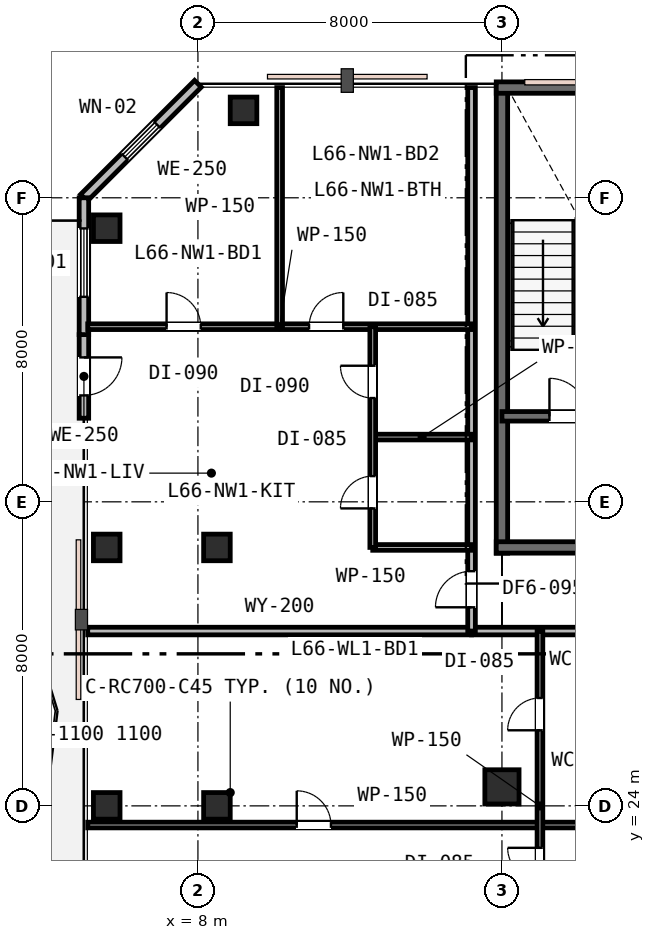
"""IFC4 building model, lengths in metres.
Left out: names, types, materials, properties, quantities, classifications, styles, units other than length and angle.
Written with IfcOpenShell. Run it as: python <this file> out.ifc"""

import sys

from ifc_helpers import new_model, si_unit, direction, frame, frame_2d, origin, origin_2d, place, context, subcontext, project, spatial, rectangle, extrude, element, fill, save


model = new_model("IFC4")
c1 = context("Model", 3, precision=1e-05, world=origin(), true_north=direction((0.0, 1.0)))
c2 = subcontext(c1, "Body", "Model", "MODEL_VIEW")
j1 = project(units=[si_unit("LENGTHUNIT", "METRE"), si_unit("PLANEANGLEUNIT", "RADIAN")], contexts=[c1])
p1 = place(None, origin())
s1 = spatial("IfcSite", under=j1, at=p1, CompositionType="ELEMENT")
p2 = place(p1, origin())
s2 = spatial("IfcBuilding", under=s1, at=p2, CompositionType="ELEMENT")
p3 = place(p2, frame((0.0, 0.0, 256.4)))
s3 = spatial("IfcBuildingStorey", under=s2, at=p3, CompositionType="ELEMENT", Elevation=256.4)
p4 = place(p3, frame((16.0, 30.65, 0.0), z_axis=(0.0, 0.0, 1.0), x_axis=(0.0, 1.0, 0.0)))
e1 = element("IfcWall", 1, at=p4, inside=s3, PredefinedType="SHEAR", context=c2, shape_type="SweptSolid", body=[
    extrude(rectangle(XDim=12.3, YDim=0.3, at=frame_2d((6.15, 0.0))), origin(), (0.0, 0.0, 1.0), 3.8),
])
p5 = place(p3, frame((15.85, 42.9, 0.0), z_axis=(0.0, 0.0, 1.0), x_axis=(1.0, 0.0, 0.0)))
e2 = element("IfcWall", 2, at=p5, inside=s3, PredefinedType="SHEAR", context=c2, shape_type="SweptSolid", body=[
    extrude(rectangle(XDim=24.3, YDim=0.3, at=frame_2d((12.15, 0.0))), origin(), (0.0, 0.0, 1.0), 3.8),
])
p6 = place(p3, frame((15.85, 30.8, 0.0), z_axis=(0.0, 0.0, 1.0), x_axis=(1.0, 0.0, 0.0)))
e3 = element("IfcWall", 3, at=p6, inside=s3, PredefinedType="SHEAR", context=c2, shape_type="SweptSolid", body=[
    extrude(rectangle(XDim=11.2, YDim=0.3, at=frame_2d((5.6, 0.0))), origin(), (0.0, 0.0, 1.0), 3.8),
])
p7 = place(p6, frame((2.45, 0.0, 0.0)))
e4 = element("IfcOpeningElement", 4, at=p7, cuts=e3, PredefinedType="OPENING", context=c2, shape_type="SweptSolid", body=[
    extrude(rectangle(XDim=1.1, YDim=2.15, at=frame_2d((0.55, 1.075))), frame((0.0, 0.16, 0.0), z_axis=(0.0, -1.0, 0.0), x_axis=(1.0, 0.0, 0.0)), (0.0, 0.0, 1.0), 0.32),
])
p8 = place(p3, frame((16.0, 34.25, 0.0), z_axis=(0.0, 0.0, 1.0), x_axis=(1.0, 0.0, 0.0)))
e5 = element("IfcWall", 5, at=p8, inside=s3, PredefinedType="SHEAR", context=c2, shape_type="SweptSolid", body=[
    extrude(rectangle(XDim=6.05, YDim=0.25, at=frame_2d((3.025, 0.0))), origin(), (0.0, 0.0, 1.0), 3.8),
])
p9 = place(p8, frame((1.25, 0.0, 0.0)))
e6 = element("IfcOpeningElement", 6, at=p9, cuts=e5, PredefinedType="OPENING", context=c2, shape_type="SweptSolid", body=[
    extrude(rectangle(XDim=1.0, YDim=2.15, at=frame_2d((0.5, 1.075))), frame((0.0, 0.135, 0.0), z_axis=(0.0, -1.0, 0.0), x_axis=(1.0, 0.0, 0.0)), (0.0, 0.0, 1.0), 0.27),
])
p10 = place(p8, frame((4.2, 0.0, 0.0)))
e7 = element("IfcOpeningElement", 7, at=p10, cuts=e5, PredefinedType="OPENING", context=c2, shape_type="SweptSolid", body=[
    extrude(rectangle(XDim=1.1, YDim=2.15, at=frame_2d((0.55, 1.075))), frame((0.0, 0.135, 0.0), z_axis=(0.0, -1.0, 0.0), x_axis=(1.0, 0.0, 0.0)), (0.0, 0.0, 1.0), 0.27),
])
p11 = place(p3, frame((8.5, 24.0, 0.0), z_axis=(0.0, 0.0, 1.0), x_axis=(1.0, 0.0, 0.0)))
e8 = element("IfcColumn", 8, at=p11, inside=s3, PredefinedType="COLUMN", context=c2, shape_type="SweptSolid", body=[
    extrude(rectangle(XDim=0.7, YDim=0.7, at=origin_2d()), origin(), (0.0, 0.0, 1.0), 3.8),
])
p12 = place(p3, frame((16.0, 24.5, 0.0), z_axis=(0.0, 0.0, 1.0), x_axis=(1.0, 0.0, 0.0)))
e9 = element("IfcColumn", 9, at=p12, inside=s3, PredefinedType="COLUMN", context=c2, shape_type="SweptSolid", body=[
    extrude(rectangle(XDim=0.9, YDim=0.9, at=origin_2d()), origin(), (0.0, 0.0, 1.0), 3.8),
])
for number, where, z_axis, x_axis in (
    (10, (5.6, 24.0, 0.0), (0.0, 0.0, 1.0), (1.0, 0.0, 0.0)),
    (11, (5.6, 30.8, 0.0), (0.0, 0.0, 1.0), (1.0, 0.0, 0.0)),
    (12, (5.6, 39.2, 0.0), (0.0, 0.0, 1.0), (1.0, 0.0, 0.0)),
    (13, (8.5, 30.8, 0.0), (0.0, 0.0, 1.0), (1.0, 0.0, 0.0)),
    (14, (9.2, 42.3, 0.0), (0.0, 0.0, 1.0), (1.0, 0.0, 0.0)),
):
    element("IfcColumn", number, at=place(p3, frame(where, z_axis=z_axis, x_axis=x_axis)), inside=s3, PredefinedType="COLUMN", context=c2, shape_type="SweptSolid", body=[
        extrude(rectangle(XDim=0.7, YDim=0.7, at=origin_2d()), origin(), (0.0, 0.0, 1.0), 3.8),
    ])
p13 = place(p3, frame((8.0, 43.0, 0.0), z_axis=(0.0, 0.0, 1.0), x_axis=(-0.707106781187, -0.707106781187, 0.0)))
e15 = element("IfcWall", 15, at=p13, inside=s3, PredefinedType="STANDARD", context=c2, shape_type="SweptSolid", body=[
    extrude(rectangle(XDim=4.243, YDim=0.25, at=frame_2d((2.121, 0.0))), origin(), (0.0, 0.0, 1.0), 3.53),
])
p14 = place(p13, frame((1.521, 0.0, 0.85)))
e16 = element("IfcOpeningElement", 16, at=p14, cuts=e15, PredefinedType="OPENING", context=c2, shape_type="SweptSolid", body=[
    extrude(rectangle(XDim=1.2, YDim=1.6, at=frame_2d((0.6, 0.8))), frame((0.0, 0.135, 0.0), z_axis=(0.0, -1.0, 0.0), x_axis=(1.0, 0.0, 0.0)), (0.0, 0.0, 1.0), 0.27),
])
p15 = place(p3, frame((5.0, 36.4, 0.0), z_axis=(0.0, 0.0, 1.0), x_axis=(0.0, -1.0, 0.0)))
e17 = element("IfcWall", 17, at=p15, inside=s3, PredefinedType="STANDARD", context=c2, shape_type="SweptSolid", body=[
    extrude(rectangle(XDim=2.2, YDim=0.25, at=frame_2d((1.1, 0.0))), origin(), (0.0, 0.0, 1.0), 3.53),
])
p16 = place(p15, frame((0.6, 0.0, 0.0)))
e18 = element("IfcOpeningElement", 18, at=p16, cuts=e17, PredefinedType="OPENING", context=c2, shape_type="SweptSolid", body=[
    extrude(rectangle(XDim=1.0, YDim=2.15, at=frame_2d((0.5, 1.075))), frame((0.0, 0.135, 0.0), z_axis=(0.0, -1.0, 0.0), x_axis=(1.0, 0.0, 0.0)), (0.0, 0.0, 1.0), 0.27),
])
p17 = place(p3, frame((5.0, 40.0, 0.0), z_axis=(0.0, 0.0, 1.0), x_axis=(0.0, -1.0, 0.0)))
e19 = element("IfcWall", 19, at=p17, inside=s3, PredefinedType="STANDARD", context=c2, shape_type="SweptSolid", body=[
    extrude(rectangle(XDim=3.6, YDim=0.25, at=frame_2d((1.8, 0.0))), origin(), (0.0, 0.0, 1.0), 3.53),
])
p18 = place(p17, frame((0.806, 0.0, 0.75)))
e20 = element("IfcOpeningElement", 20, at=p18, cuts=e19, PredefinedType="OPENING", context=c2, shape_type="SweptSolid", body=[
    extrude(rectangle(XDim=1.8, YDim=1.85, at=frame_2d((0.9, 0.925))), frame((0.0, 0.135, 0.0), z_axis=(0.0, -1.0, 0.0), x_axis=(1.0, 0.0, 0.0)), (0.0, 0.0, 1.0), 0.27),
])
p19 = place(p3, frame((5.1, 28.6, 0.0), z_axis=(0.0, 0.0, 1.0), x_axis=(1.0, 0.0, 0.0)))
e21 = element("IfcWall", 21, at=p19, inside=s3, PredefinedType="PARTITIONING", context=c2, shape_type="SweptSolid", body=[
    extrude(rectangle(XDim=10.1, YDim=0.2, at=frame_2d((5.05, 0.0))), origin(), (0.0, 0.0, 1.0), 3.16),
])
p20 = place(p3, frame((15.2, 28.6, 0.0), z_axis=(0.0, 0.0, 1.0), x_axis=(1.0, 0.0, 0.0)))
e22 = element("IfcWall", 22, at=p20, inside=s3, PredefinedType="PARTITIONING", context=c2, shape_type="SweptSolid", body=[
    extrude(rectangle(XDim=4.4, YDim=0.2, at=frame_2d((2.2, 0.0))), origin(), (0.0, 0.0, 1.0), 3.16),
])
p21 = place(p3, frame((15.2, 28.6, 0.0), z_axis=(0.0, 0.0, 1.0), x_axis=(0.0, 1.0, 0.0)))
e23 = element("IfcWall", 23, at=p21, inside=s3, PredefinedType="PARTITIONING", context=c2, shape_type="SweptSolid", body=[
    extrude(rectangle(XDim=14.3, YDim=0.2, at=frame_2d((7.15, 0.0))), origin(), (0.0, 0.0, 1.0), 3.16),
])
p22 = place(p21, frame((0.625, 0.0, 0.0)))
e24 = element("IfcOpeningElement", 24, at=p22, cuts=e23, PredefinedType="OPENING", context=c2, shape_type="SweptSolid", body=[
    extrude(rectangle(XDim=0.95, YDim=2.15, at=frame_2d((0.475, 1.075))), frame((0.0, 0.11, 0.0), z_axis=(0.0, -1.0, 0.0), x_axis=(1.0, 0.0, 0.0)), (0.0, 0.0, 1.0), 0.22),
])
p23 = place(p3, frame((12.6, 30.8, 0.0), z_axis=(0.0, 0.0, 1.0), x_axis=(1.0, 0.0, 0.0)))
e25 = element("IfcWall", 25, at=p23, inside=s3, PredefinedType="PARTITIONING", context=c2, shape_type="SweptSolid", body=[
    extrude(rectangle(XDim=2.6, YDim=0.15, at=frame_2d((1.3, 0.0))), origin(), (0.0, 0.0, 1.0), 3.16),
])
p24 = place(p3, frame((12.6, 33.704, 0.0), z_axis=(0.0, 0.0, 1.0), x_axis=(1.0, 0.0, 0.0)))
e26 = element("IfcWall", 26, at=p24, inside=s3, PredefinedType="PARTITIONING", context=c2, shape_type="SweptSolid", body=[
    extrude(rectangle(XDim=2.6, YDim=0.15, at=frame_2d((1.3, 0.0))), origin(), (0.0, 0.0, 1.0), 3.53),
])
p25 = place(p3, frame((5.1, 36.608, 0.0), z_axis=(0.0, 0.0, 1.0), x_axis=(1.0, 0.0, 0.0)))
e27 = element("IfcWall", 27, at=p25, inside=s3, PredefinedType="PARTITIONING", context=c2, shape_type="SweptSolid", body=[
    extrude(rectangle(XDim=10.1, YDim=0.15, at=frame_2d((5.05, 0.0))), origin(), (0.0, 0.0, 1.0), 3.27),
])
p26 = place(p25, frame((2.075, 0.0, 0.0)))
e28 = element("IfcOpeningElement", 28, at=p26, cuts=e27, PredefinedType="OPENING", context=c2, shape_type="SweptSolid", body=[
    extrude(rectangle(XDim=0.9, YDim=2.15, at=frame_2d((0.45, 1.075))), frame((0.0, 0.085, 0.0), z_axis=(0.0, -1.0, 0.0), x_axis=(1.0, 0.0, 0.0)), (0.0, 0.0, 1.0), 0.17),
])
p27 = place(p25, frame((5.825, 0.0, 0.0)))
e29 = element("IfcOpeningElement", 29, at=p27, cuts=e27, PredefinedType="OPENING", context=c2, shape_type="SweptSolid", body=[
    extrude(rectangle(XDim=0.9, YDim=2.15, at=frame_2d((0.45, 1.075))), frame((0.0, 0.085, 0.0), z_axis=(0.0, -1.0, 0.0), x_axis=(1.0, 0.0, 0.0)), (0.0, 0.0, 1.0), 0.17),
])
p28 = place(p3, frame((12.6, 30.8, 0.0), z_axis=(0.0, 0.0, 1.0), x_axis=(0.0, 1.0, 0.0)))
e30 = element("IfcWall", 30, at=p28, inside=s3, PredefinedType="PARTITIONING", context=c2, shape_type="SweptSolid", body=[
    extrude(rectangle(XDim=5.808, YDim=0.15, at=frame_2d((2.904, 0.0))), origin(), (0.0, 0.0, 1.0), 3.16),
])
p29 = place(p28, frame((1.027, 0.0, 0.0)))
e31 = element("IfcOpeningElement", 31, at=p29, cuts=e30, PredefinedType="OPENING", context=c2, shape_type="SweptSolid", body=[
    extrude(rectangle(XDim=0.85, YDim=2.15, at=frame_2d((0.425, 1.075))), frame((0.0, 0.085, 0.0), z_axis=(0.0, -1.0, 0.0), x_axis=(1.0, 0.0, 0.0)), (0.0, 0.0, 1.0), 0.17),
])
p30 = place(p28, frame((3.931, 0.0, 0.0)))
e32 = element("IfcOpeningElement", 32, at=p30, cuts=e30, PredefinedType="OPENING", context=c2, shape_type="SweptSolid", body=[
    extrude(rectangle(XDim=0.85, YDim=2.15, at=frame_2d((0.425, 1.075))), frame((0.0, 0.085, 0.0), z_axis=(0.0, -1.0, 0.0), x_axis=(1.0, 0.0, 0.0)), (0.0, 0.0, 1.0), 0.17),
])
p31 = place(p3, frame((10.15, 36.608, 0.0), z_axis=(0.0, 0.0, 1.0), x_axis=(0.0, 1.0, 0.0)))
e33 = element("IfcWall", 33, at=p31, inside=s3, PredefinedType="PARTITIONING", context=c2, shape_type="SweptSolid", body=[
    extrude(rectangle(XDim=6.292, YDim=0.15, at=frame_2d((3.146, 0.0))), origin(), (0.0, 0.0, 1.0), 3.53),
])
p32 = place(p3, frame((5.1, 23.496, 0.0), z_axis=(0.0, 0.0, 1.0), x_axis=(1.0, 0.0, 0.0)))
e34 = element("IfcWall", 34, at=p32, inside=s3, PredefinedType="PARTITIONING", context=c2, shape_type="SweptSolid", body=[
    extrude(rectangle(XDim=14.5, YDim=0.15, at=frame_2d((7.25, 0.0))), origin(), (0.0, 0.0, 1.0), 3.16),
])
p33 = place(p32, frame((5.5, 0.0, 0.0)))
e35 = element("IfcOpeningElement", 35, at=p33, cuts=e34, PredefinedType="OPENING", context=c2, shape_type="SweptSolid", body=[
    extrude(rectangle(XDim=0.9, YDim=2.15, at=frame_2d((0.45, 1.075))), frame((0.0, 0.085, 0.0), z_axis=(0.0, -1.0, 0.0), x_axis=(1.0, 0.0, 0.0)), (0.0, 0.0, 1.0), 0.17),
])
p34 = place(p3, frame((17.0, 19.396, 0.0), z_axis=(0.0, 0.0, 1.0), x_axis=(0.0, 1.0, 0.0)))
e36 = element("IfcWall", 36, at=p34, inside=s3, PredefinedType="PARTITIONING", context=c2, shape_type="SweptSolid", body=[
    extrude(rectangle(XDim=9.204, YDim=0.15, at=frame_2d((4.602, 0.0))), origin(), (0.0, 0.0, 1.0), 3.16),
])
p35 = place(p34, frame((0.6, 0.0, 0.0)))
e37 = element("IfcOpeningElement", 37, at=p35, cuts=e36, PredefinedType="OPENING", context=c2, shape_type="SweptSolid", body=[
    extrude(rectangle(XDim=0.85, YDim=2.15, at=frame_2d((0.425, 1.075))), frame((0.0, 0.085, 0.0), z_axis=(0.0, -1.0, 0.0), x_axis=(1.0, 0.0, 0.0)), (0.0, 0.0, 1.0), 0.17),
])
p36 = place(p34, frame((2.65, 0.0, 0.0)))
e38 = element("IfcOpeningElement", 38, at=p36, cuts=e36, PredefinedType="OPENING", context=c2, shape_type="SweptSolid", body=[
    extrude(rectangle(XDim=0.85, YDim=2.15, at=frame_2d((0.425, 1.075))), frame((0.0, 0.085, 0.0), z_axis=(0.0, -1.0, 0.0), x_axis=(1.0, 0.0, 0.0)), (0.0, 0.0, 1.0), 0.17),
])
p37 = place(p34, frame((6.593, 0.0, 0.0)))
e39 = element("IfcOpeningElement", 39, at=p37, cuts=e36, PredefinedType="OPENING", context=c2, shape_type="SweptSolid", body=[
    extrude(rectangle(XDim=0.85, YDim=2.15, at=frame_2d((0.425, 1.075))), frame((0.0, 0.085, 0.0), z_axis=(0.0, -1.0, 0.0), x_axis=(1.0, 0.0, 0.0)), (0.0, 0.0, 1.0), 0.17),
])
p38 = place(p14, origin())
e40 = element("IfcWindow", 40, at=p38, inside=s3, PartitioningType="SINGLE_PANEL", PredefinedType="WINDOW", context=c2, shape_type="SweptSolid", body=[
    extrude(rectangle(XDim=1.2, YDim=1.6, at=frame_2d((0.6, 0.8))), frame((0.0, 0.03, 0.0), z_axis=(0.0, -1.0, 0.0), x_axis=(1.0, 0.0, 0.0)), (0.0, 0.0, 1.0), 0.06),
])
fill(e16, e40)
p39 = place(p16, origin())
e41 = element("IfcDoor", 41, at=p39, inside=s3, OperationType="SINGLE_SWING_LEFT", PredefinedType="DOOR", context=c2, shape_type="SweptSolid", body=[
    extrude(rectangle(XDim=1.0, YDim=2.15, at=frame_2d((0.5, 1.075))), frame((0.0, 0.025, 0.0), z_axis=(0.0, -1.0, 0.0), x_axis=(1.0, 0.0, 0.0)), (0.0, 0.0, 1.0), 0.05),
])
fill(e18, e41)
p40 = place(p18, origin())
e42 = element("IfcWindow", 42, at=p40, inside=s3, PartitioningType="SINGLE_PANEL", PredefinedType="WINDOW", context=c2, shape_type="SweptSolid", body=[
    extrude(rectangle(XDim=1.8, YDim=1.85, at=frame_2d((0.9, 0.925))), frame((0.0, 0.03, 0.0), z_axis=(0.0, -1.0, 0.0), x_axis=(1.0, 0.0, 0.0)), (0.0, 0.0, 1.0), 0.06),
])
fill(e20, e42)
p41 = place(p9, origin())
e43 = element("IfcDoor", 43, at=p41, inside=s3, OperationType="SINGLE_SWING_LEFT", PredefinedType="DOOR", context=c2, shape_type="SweptSolid", body=[
    extrude(rectangle(XDim=1.0, YDim=2.15, at=frame_2d((0.5, 1.075))), frame((0.0, 0.025, 0.0), z_axis=(0.0, -1.0, 0.0), x_axis=(1.0, 0.0, 0.0)), (0.0, 0.0, 1.0), 0.05),
])
fill(e6, e43)
p42 = place(p22, origin())
e44 = element("IfcDoor", 44, at=p42, inside=s3, OperationType="SINGLE_SWING_LEFT", PredefinedType="DOOR", context=c2, shape_type="SweptSolid", body=[
    extrude(rectangle(XDim=0.95, YDim=2.15, at=frame_2d((0.475, 1.075))), frame((0.0, 0.025, 0.0), z_axis=(0.0, -1.0, 0.0), x_axis=(1.0, 0.0, 0.0)), (0.0, 0.0, 1.0), 0.05),
])
fill(e24, e44)
p43 = place(p29, origin())
e45 = element("IfcDoor", 45, at=p43, inside=s3, OperationType="SINGLE_SWING_LEFT", PredefinedType="DOOR", context=c2, shape_type="SweptSolid", body=[
    extrude(rectangle(XDim=0.85, YDim=2.15, at=frame_2d((0.425, 1.075))), frame((0.0, 0.025, 0.0), z_axis=(0.0, -1.0, 0.0), x_axis=(1.0, 0.0, 0.0)), (0.0, 0.0, 1.0), 0.05),
])
fill(e31, e45)
p44 = place(p30, origin())
e46 = element("IfcDoor", 46, at=p44, inside=s3, OperationType="SINGLE_SWING_RIGHT", PredefinedType="DOOR", context=c2, shape_type="SweptSolid", body=[
    extrude(rectangle(XDim=0.85, YDim=2.15, at=frame_2d((0.425, 1.075))), frame((0.0, 0.025, 0.0), z_axis=(0.0, -1.0, 0.0), x_axis=(1.0, 0.0, 0.0)), (0.0, 0.0, 1.0), 0.05),
])
fill(e32, e46)
p45 = place(p26, origin())
e47 = element("IfcDoor", 47, at=p45, inside=s3, OperationType="SINGLE_SWING_LEFT", PredefinedType="DOOR", context=c2, shape_type="SweptSolid", body=[
    extrude(rectangle(XDim=0.9, YDim=2.15, at=frame_2d((0.45, 1.075))), frame((0.0, 0.025, 0.0), z_axis=(0.0, -1.0, 0.0), x_axis=(1.0, 0.0, 0.0)), (0.0, 0.0, 1.0), 0.05),
])
fill(e28, e47)
p46 = place(p27, origin())
e48 = element("IfcDoor", 48, at=p46, inside=s3, OperationType="SINGLE_SWING_RIGHT", PredefinedType="DOOR", context=c2, shape_type="SweptSolid", body=[
    extrude(rectangle(XDim=0.9, YDim=2.15, at=frame_2d((0.45, 1.075))), frame((0.0, 0.025, 0.0), z_axis=(0.0, -1.0, 0.0), x_axis=(1.0, 0.0, 0.0)), (0.0, 0.0, 1.0), 0.05),
])
fill(e29, e48)
p47 = place(p36, origin())
e49 = element("IfcDoor", 49, at=p47, inside=s3, OperationType="SINGLE_SWING_RIGHT", PredefinedType="DOOR", context=c2, shape_type="SweptSolid", body=[
    extrude(rectangle(XDim=0.85, YDim=2.15, at=frame_2d((0.425, 1.075))), frame((0.0, 0.025, 0.0), z_axis=(0.0, -1.0, 0.0), x_axis=(1.0, 0.0, 0.0)), (0.0, 0.0, 1.0), 0.05),
])
fill(e38, e49)
p48 = place(p37, origin())
e50 = element("IfcDoor", 50, at=p48, inside=s3, OperationType="SINGLE_SWING_LEFT", PredefinedType="DOOR", context=c2, shape_type="SweptSolid", body=[
    extrude(rectangle(XDim=0.85, YDim=2.15, at=frame_2d((0.425, 1.075))), frame((0.0, 0.025, 0.0), z_axis=(0.0, -1.0, 0.0), x_axis=(1.0, 0.0, 0.0)), (0.0, 0.0, 1.0), 0.05),
])
fill(e39, e50)
p49 = place(p33, origin())
e51 = element("IfcDoor", 51, at=p49, inside=s3, OperationType="SINGLE_SWING_LEFT", PredefinedType="DOOR", context=c2, shape_type="SweptSolid", body=[
    extrude(rectangle(XDim=0.9, YDim=2.15, at=frame_2d((0.45, 1.075))), frame((0.0, 0.025, 0.0), z_axis=(0.0, -1.0, 0.0), x_axis=(1.0, 0.0, 0.0)), (0.0, 0.0, 1.0), 0.05),
])
fill(e35, e51)
save(model, sys.argv[1])
